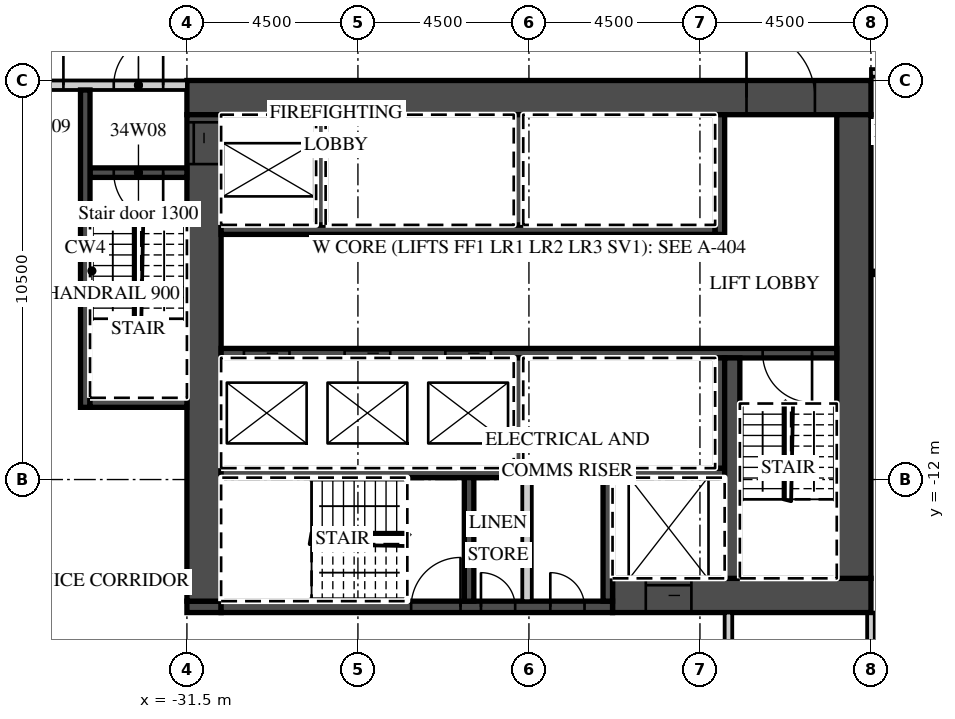
"""IFC4 building model, lengths in metres.
Left out: names, types, materials, properties, quantities, classifications, styles, units other than length and angle.
Written with IfcOpenShell. Run it as: python <this file> out.ifc"""

import sys

from ifc_helpers import new_model, si_unit, direction, frame, frame_2d, origin, place, context, subcontext, project, spatial, rectangle, extrude, element, fill, save


model = new_model("IFC4")
c1 = context("Model", 3, precision=1e-05, world=origin(), true_north=direction((0.0, 1.0)))
c2 = subcontext(c1, "Body", "Model", "MODEL_VIEW")
j1 = project(units=[si_unit("LENGTHUNIT", "METRE"), si_unit("PLANEANGLEUNIT", "RADIAN")], contexts=[c1])
p1 = place(None, origin())
s1 = spatial("IfcSite", under=j1, at=p1, CompositionType="ELEMENT")
p2 = place(p1, origin())
s2 = spatial("IfcBuilding", under=s1, at=p2, CompositionType="ELEMENT")
p3 = place(p2, frame((0.0, 0.0, 147.1)))
s3 = spatial("IfcBuildingStorey", under=s2, at=p3, CompositionType="ELEMENT", Elevation=147.1)
p4 = place(p3, frame((-13.5, -22.232, 0.0), z_axis=(0.0, 0.0, 1.0), x_axis=(0.0, 1.0, 0.0)))
e1 = element("IfcWall", 1, at=p4, inside=s3, PredefinedType="PARTITIONING", context=c2, shape_type="SweptSolid", body=[
    extrude(rectangle(XDim=6.732, YDim=0.2, at=frame_2d((3.366, 0.0))), origin(), (0.0, 0.0, 1.0), 3.0),
])
p5 = place(p3, frame((-13.5, -1.3, 0.0), z_axis=(0.0, 0.0, 1.0), x_axis=(1.0, 0.0, 0.0)))
e2 = element("IfcWall", 2, at=p5, inside=s3, PredefinedType="PARTITIONING", context=c2, shape_type="SweptSolid", body=[
    extrude(rectangle(XDim=60.932, YDim=0.2, at=frame_2d((30.466, 0.0))), origin(), (0.0, 0.0, 1.0), 3.0),
])
p6 = place(p5, frame((2.925, 0.0, 0.0)))
e3 = element("IfcOpeningElement", 3, at=p6, cuts=e2, PredefinedType="OPENING", context=c2, shape_type="SweptSolid", body=[
    extrude(rectangle(XDim=1.0, YDim=2.1, at=frame_2d((0.5, 1.05))), frame((0.0, 0.11, 0.0), z_axis=(0.0, -1.0, 0.0), x_axis=(1.0, 0.0, 0.0)), (0.0, 0.0, 1.0), 0.22),
])
p7 = place(p5, frame((6.938, 0.0, 0.0)))
e4 = element("IfcOpeningElement", 4, at=p7, cuts=e2, PredefinedType="OPENING", context=c2, shape_type="SweptSolid", body=[
    extrude(rectangle(XDim=1.2, YDim=2.1, at=frame_2d((0.6, 1.05))), frame((0.0, 0.11, 0.0), z_axis=(0.0, -1.0, 0.0), x_axis=(1.0, 0.0, 0.0)), (0.0, 0.0, 1.0), 0.22),
])
p8 = place(p5, frame((15.938, 0.0, 0.0)))
e5 = element("IfcOpeningElement", 5, at=p8, cuts=e2, PredefinedType="OPENING", context=c2, shape_type="SweptSolid", body=[
    extrude(rectangle(XDim=1.2, YDim=2.1, at=frame_2d((0.6, 1.05))), frame((0.0, 0.11, 0.0), z_axis=(0.0, -1.0, 0.0), x_axis=(1.0, 0.0, 0.0)), (0.0, 0.0, 1.0), 0.22),
])
p9 = place(p5, frame((24.938, 0.0, 0.0)))
e6 = element("IfcOpeningElement", 6, at=p9, cuts=e2, PredefinedType="OPENING", context=c2, shape_type="SweptSolid", body=[
    extrude(rectangle(XDim=1.2, YDim=2.1, at=frame_2d((0.6, 1.05))), frame((0.0, 0.11, 0.0), z_axis=(0.0, -1.0, 0.0), x_axis=(1.0, 0.0, 0.0)), (0.0, 0.0, 1.0), 0.22),
])
p10 = place(p5, frame((32.075, 0.0, 0.0)))
e7 = element("IfcOpeningElement", 7, at=p10, cuts=e2, PredefinedType="OPENING", context=c2, shape_type="SweptSolid", body=[
    extrude(rectangle(XDim=1.0, YDim=2.1, at=frame_2d((0.5, 1.05))), frame((0.0, 0.11, 0.0), z_axis=(0.0, -1.0, 0.0), x_axis=(1.0, 0.0, 0.0)), (0.0, 0.0, 1.0), 0.22),
])
p11 = place(p5, frame((36.55, 0.0, 0.0)))
e8 = element("IfcOpeningElement", 8, at=p11, cuts=e2, PredefinedType="OPENING", context=c2, shape_type="SweptSolid", body=[
    extrude(rectangle(XDim=1.0, YDim=2.1, at=frame_2d((0.5, 1.05))), frame((0.0, 0.11, 0.0), z_axis=(0.0, -1.0, 0.0), x_axis=(1.0, 0.0, 0.0)), (0.0, 0.0, 1.0), 0.22),
])
p12 = place(p5, frame((42.938, 0.0, 0.0)))
e9 = element("IfcOpeningElement", 9, at=p12, cuts=e2, PredefinedType="OPENING", context=c2, shape_type="SweptSolid", body=[
    extrude(rectangle(XDim=1.2, YDim=2.1, at=frame_2d((0.6, 1.05))), frame((0.0, 0.11, 0.0), z_axis=(0.0, -1.0, 0.0), x_axis=(1.0, 0.0, 0.0)), (0.0, 0.0, 1.0), 0.22),
])
p13 = place(p5, frame((52.425, 0.0, 0.0)))
e10 = element("IfcOpeningElement", 10, at=p13, cuts=e2, PredefinedType="OPENING", context=c2, shape_type="SweptSolid", body=[
    extrude(rectangle(XDim=1.0, YDim=2.1, at=frame_2d((0.5, 1.05))), frame((0.0, 0.11, 0.0), z_axis=(0.0, -1.0, 0.0), x_axis=(1.0, 0.0, 0.0)), (0.0, 0.0, 1.0), 0.22),
])
p14 = place(p5, frame((58.316, 0.0, 0.0)))
e11 = element("IfcOpeningElement", 11, at=p14, cuts=e2, PredefinedType="OPENING", context=c2, shape_type="SweptSolid", body=[
    extrude(rectangle(XDim=1.2, YDim=2.1, at=frame_2d((0.6, 1.05))), frame((0.0, 0.11, 0.0), z_axis=(0.0, -1.0, 0.0), x_axis=(1.0, 0.0, 0.0)), (0.0, 0.0, 1.0), 0.22),
])
p15 = place(p3, frame((-31.5, -1.95, 0.0), z_axis=(0.0, 0.0, 1.0), x_axis=(1.0, 0.0, 0.0)))
e12 = element("IfcWall", 12, at=p15, inside=s3, PredefinedType="SHEAR", context=c2, shape_type="SweptSolid", body=[
    extrude(rectangle(XDim=18.0, YDim=0.9, at=frame_2d((9.0, 0.0))), origin(), (0.0, 0.0, 1.0), 3.0),
])
p16 = place(p15, frame((14.725, 0.0, 0.0)))
e13 = element("IfcOpeningElement", 13, at=p16, cuts=e12, PredefinedType="OPENING", context=c2, shape_type="SweptSolid", body=[
    extrude(rectangle(XDim=1.8, YDim=2.1, at=frame_2d((0.9, 1.05))), frame((0.0, 0.46, 0.0), z_axis=(0.0, -1.0, 0.0), x_axis=(1.0, 0.0, 0.0)), (0.0, 0.0, 1.0), 0.92),
])
p17 = place(p3, frame((-20.3, -15.05, 0.0), z_axis=(0.0, 0.0, 1.0), x_axis=(1.0, 0.0, 0.0)))
e14 = element("IfcWall", 14, at=p17, inside=s3, PredefinedType="SHEAR", context=c2, shape_type="SweptSolid", body=[
    extrude(rectangle(XDim=6.8, YDim=0.9, at=frame_2d((3.4, 0.0))), origin(), (0.0, 0.0, 1.0), 3.0),
])
p18 = place(p17, frame((0.875, 0.0, 0.0)))
e15 = element("IfcOpeningElement", 15, at=p18, cuts=e14, PredefinedType="OPENING", context=c2, shape_type="SweptSolid", body=[
    extrude(rectangle(XDim=1.2, YDim=2.1, at=frame_2d((0.6, 1.05))), frame((0.0, 0.46, 0.0), z_axis=(0.0, -1.0, 0.0), x_axis=(1.0, 0.0, 0.0)), (0.0, 0.0, 1.0), 0.92),
])
p19 = place(p3, frame((-31.5, -15.35, 0.0), z_axis=(0.0, 0.0, 1.0), x_axis=(1.0, 0.0, 0.0)))
e16 = element("IfcWall", 16, at=p19, inside=s3, PredefinedType="SHEAR", context=c2, shape_type="SweptSolid", body=[
    extrude(rectangle(XDim=0.9, YDim=0.3, at=frame_2d((0.45, 0.0))), origin(), (0.0, 0.0, 1.0), 3.0),
])
p20 = place(p3, frame((-30.6, -15.35, 0.0), z_axis=(0.0, 0.0, 1.0), x_axis=(1.0, 0.0, 0.0)))
e17 = element("IfcWall", 17, at=p20, inside=s3, PredefinedType="SHEAR", context=c2, shape_type="SweptSolid", body=[
    extrude(rectangle(XDim=10.3, YDim=0.3, at=frame_2d((5.15, 0.0))), origin(), (0.0, 0.0, 1.0), 3.0),
])
p21 = place(p20, frame((5.0, 0.0, 0.0)))
e18 = element("IfcOpeningElement", 18, at=p21, cuts=e17, PredefinedType="OPENING", context=c2, shape_type="SweptSolid", body=[
    extrude(rectangle(XDim=1.3, YDim=2.1, at=frame_2d((0.65, 1.05))), frame((0.0, 0.16, 0.0), z_axis=(0.0, -1.0, 0.0), x_axis=(1.0, 0.0, 0.0)), (0.0, 0.0, 1.0), 0.32),
])
p22 = place(p20, frame((6.837, 0.0, 0.0)))
e19 = element("IfcOpeningElement", 19, at=p22, cuts=e17, PredefinedType="OPENING", context=c2, shape_type="SweptSolid", body=[
    extrude(rectangle(XDim=0.9, YDim=2.1, at=frame_2d((0.45, 1.05))), frame((0.0, 0.16, 0.0), z_axis=(0.0, -1.0, 0.0), x_axis=(1.0, 0.0, 0.0)), (0.0, 0.0, 1.0), 0.32),
])
p23 = place(p20, frame((8.663, 0.0, 0.0)))
e20 = element("IfcOpeningElement", 20, at=p23, cuts=e17, PredefinedType="OPENING", context=c2, shape_type="SweptSolid", body=[
    extrude(rectangle(XDim=0.9, YDim=2.1, at=frame_2d((0.45, 1.05))), frame((0.0, 0.16, 0.0), z_axis=(0.0, -1.0, 0.0), x_axis=(1.0, 0.0, 0.0)), (0.0, 0.0, 1.0), 0.32),
])
p24 = place(p3, frame((-31.05, -15.2, 0.0), z_axis=(0.0, 0.0, 1.0), x_axis=(0.0, 1.0, 0.0)))
e21 = element("IfcWall", 21, at=p24, inside=s3, PredefinedType="SHEAR", context=c2, shape_type="SweptSolid", body=[
    extrude(rectangle(XDim=12.8, YDim=0.9, at=frame_2d((6.4, 0.0))), origin(), (0.0, 0.0, 1.0), 3.0),
])
p25 = place(p24, frame((11.5, 0.0, 0.0)))
e22 = element("IfcOpeningElement", 22, at=p25, cuts=e21, PredefinedType="OPENING", context=c2, shape_type="SweptSolid", body=[
    extrude(rectangle(XDim=1.1, YDim=2.1, at=frame_2d((0.55, 1.05))), frame((0.0, 0.46, 0.0), z_axis=(0.0, -1.0, 0.0), x_axis=(1.0, 0.0, 0.0)), (0.0, 0.0, 1.0), 0.92),
])
p26 = place(p3, frame((-13.95, -14.6, 0.0), z_axis=(0.0, 0.0, 1.0), x_axis=(0.0, 1.0, 0.0)))
e23 = element("IfcWall", 23, at=p26, inside=s3, PredefinedType="SHEAR", context=c2, shape_type="SweptSolid", body=[
    extrude(rectangle(XDim=12.2, YDim=0.9, at=frame_2d((6.1, 0.0))), origin(), (0.0, 0.0, 1.0), 3.0),
])
p27 = place(p3, frame((-30.6, -5.425, 0.0), z_axis=(0.0, 0.0, 1.0), x_axis=(1.0, 0.0, 0.0)))
e24 = element("IfcWall", 24, at=p27, inside=s3, PredefinedType="SHEAR", context=c2, shape_type="SweptSolid", body=[
    extrude(rectangle(XDim=13.0, YDim=0.25, at=frame_2d((6.5, 0.0))), origin(), (0.0, 0.0, 1.0), 3.0),
])
p28 = place(p3, frame((-17.475, -5.55, 0.0), z_axis=(0.0, 0.0, 1.0), x_axis=(0.0, 1.0, 0.0)))
e25 = element("IfcWall", 25, at=p28, inside=s3, PredefinedType="SHEAR", context=c2, shape_type="SweptSolid", body=[
    extrude(rectangle(XDim=3.15, YDim=0.25, at=frame_2d((1.575, 0.0))), origin(), (0.0, 0.0, 1.0), 3.0),
])
for number, where, z_axis, x_axis in (
    (26, (-27.975, -5.3, 0.0), (0.0, 0.0, 1.0), (0.0, 1.0, 0.0)),
    (27, (-22.775, -5.3, 0.0), (0.0, 0.0, 1.0), (0.0, 1.0, 0.0)),
):
    element("IfcWall", number, at=place(p3, frame(where, z_axis=z_axis, x_axis=x_axis)), inside=s3, PredefinedType="SHEAR", context=c2, shape_type="SweptSolid", body=[
        extrude(rectangle(XDim=2.9, YDim=0.25, at=frame_2d((1.45, 0.0))), origin(), (0.0, 0.0, 1.0), 3.0),
    ])
p29 = place(p3, frame((-30.6, -8.675, 0.0), z_axis=(0.0, 0.0, 1.0), x_axis=(1.0, 0.0, 0.0)))
e28 = element("IfcWall", 28, at=p29, inside=s3, PredefinedType="SHEAR", context=c2, shape_type="SweptSolid", body=[
    extrude(rectangle(XDim=16.2, YDim=0.25, at=frame_2d((8.1, 0.0))), origin(), (0.0, 0.0, 1.0), 3.0),
])
p30 = place(p29, frame((0.6, 0.0, 0.0)))
e29 = element("IfcOpeningElement", 29, at=p30, cuts=e28, PredefinedType="OPENING", context=c2, shape_type="SweptSolid", body=[
    extrude(rectangle(XDim=1.2, YDim=2.1, at=frame_2d((0.6, 1.05))), frame((0.0, 0.135, 0.0), z_axis=(0.0, -1.0, 0.0), x_axis=(1.0, 0.0, 0.0)), (0.0, 0.0, 1.0), 0.27),
])
p31 = place(p29, frame((3.25, 0.0, 0.0)))
e30 = element("IfcOpeningElement", 30, at=p31, cuts=e28, PredefinedType="OPENING", context=c2, shape_type="SweptSolid", body=[
    extrude(rectangle(XDim=1.2, YDim=2.1, at=frame_2d((0.6, 1.05))), frame((0.0, 0.135, 0.0), z_axis=(0.0, -1.0, 0.0), x_axis=(1.0, 0.0, 0.0)), (0.0, 0.0, 1.0), 0.27),
])
p32 = place(p29, frame((5.9, 0.0, 0.0)))
e31 = element("IfcOpeningElement", 31, at=p32, cuts=e28, PredefinedType="OPENING", context=c2, shape_type="SweptSolid", body=[
    extrude(rectangle(XDim=1.2, YDim=2.1, at=frame_2d((0.6, 1.05))), frame((0.0, 0.135, 0.0), z_axis=(0.0, -1.0, 0.0), x_axis=(1.0, 0.0, 0.0)), (0.0, 0.0, 1.0), 0.27),
])
p33 = place(p29, frame((14.25, 0.0, 0.0)))
e32 = element("IfcOpeningElement", 32, at=p33, cuts=e28, PredefinedType="OPENING", context=c2, shape_type="SweptSolid", body=[
    extrude(rectangle(XDim=1.3, YDim=2.1, at=frame_2d((0.65, 1.05))), frame((0.0, 0.135, 0.0), z_axis=(0.0, -1.0, 0.0), x_axis=(1.0, 0.0, 0.0)), (0.0, 0.0, 1.0), 0.27),
])
p34 = place(p3, frame((-30.6, -11.825, 0.0), z_axis=(0.0, 0.0, 1.0), x_axis=(1.0, 0.0, 0.0)))
e33 = element("IfcWall", 33, at=p34, inside=s3, PredefinedType="SHEAR", context=c2, shape_type="SweptSolid", body=[
    extrude(rectangle(XDim=13.25, YDim=0.25, at=frame_2d((6.625, 0.0))), origin(), (0.0, 0.0, 1.0), 3.0),
])
for number, where, z_axis, x_axis in (
    (34, (-17.475, -11.7, 0.0), (0.0, 0.0, 1.0), (0.0, 1.0, 0.0)),
    (35, (-22.775, -11.7, 0.0), (0.0, 0.0, 1.0), (0.0, 1.0, 0.0)),
):
    element("IfcWall", number, at=place(p3, frame(where, z_axis=z_axis, x_axis=x_axis)), inside=s3, PredefinedType="SHEAR", context=c2, shape_type="SweptSolid", body=[
        extrude(rectangle(XDim=2.9, YDim=0.25, at=frame_2d((1.45, 0.0))), origin(), (0.0, 0.0, 1.0), 3.0),
    ])
p35 = place(p3, frame((-17.15, -14.6, 0.0), z_axis=(0.0, 0.0, 1.0), x_axis=(0.0, 1.0, 0.0)))
e36 = element("IfcWall", 36, at=p35, inside=s3, PredefinedType="SHEAR", context=c2, shape_type="SweptSolid", body=[
    extrude(rectangle(XDim=5.8, YDim=0.4, at=frame_2d((2.9, 0.0))), origin(), (0.0, 0.0, 1.0), 3.0),
])
for number, where, z_axis, x_axis in (
    (37, (-20.425, -15.2, 0.0), (0.0, 0.0, 1.0), (0.0, 1.0, 0.0)),
    (38, (-24.075, -15.2, 0.0), (0.0, 0.0, 1.0), (0.0, 1.0, 0.0)),
):
    element("IfcWall", number, at=place(p3, frame(where, z_axis=z_axis, x_axis=x_axis)), inside=s3, PredefinedType="SHEAR", context=c2, shape_type="SweptSolid", body=[
        extrude(rectangle(XDim=3.25, YDim=0.25, at=frame_2d((1.625, 0.0))), origin(), (0.0, 0.0, 1.0), 3.0),
    ])
p36 = place(p3, frame((-22.55, -15.2, 0.0), z_axis=(0.0, 0.0, 1.0), x_axis=(0.0, 1.0, 0.0)))
e39 = element("IfcWall", 39, at=p36, inside=s3, PredefinedType="PARTITIONING", context=c2, shape_type="SweptSolid", body=[
    extrude(rectangle(XDim=3.25, YDim=0.25, at=frame_2d((1.625, 0.0))), origin(), (0.0, 0.0, 1.0), 3.0),
])
p37 = place(p3, frame((-39.035, -1.625, 0.0), z_axis=(0.0, 0.0, 1.0), x_axis=(1.0, 0.0, 0.0)))
e40 = element("IfcWall", 40, at=p37, inside=s3, PredefinedType="PARTITIONING", context=c2, shape_type="SweptSolid", body=[
    extrude(rectangle(XDim=7.535, YDim=0.25, at=frame_2d((3.768, 0.0))), origin(), (0.0, 0.0, 1.0), 3.0),
])
p38 = place(p37, frame((5.61, 0.0, 0.0)))
e41 = element("IfcOpeningElement", 41, at=p38, cuts=e40, PredefinedType="OPENING", context=c2, shape_type="SweptSolid", body=[
    extrude(rectangle(XDim=1.3, YDim=2.1, at=frame_2d((0.65, 1.05))), frame((0.0, 0.135, 0.0), z_axis=(0.0, -1.0, 0.0), x_axis=(1.0, 0.0, 0.0)), (0.0, 0.0, 1.0), 0.27),
])
p39 = place(p37, frame((3.185, 0.0, 0.0)))
e42 = element("IfcOpeningElement", 42, at=p39, cuts=e40, PredefinedType="OPENING", context=c2, shape_type="SweptSolid", body=[
    extrude(rectangle(XDim=1.1, YDim=2.1, at=frame_2d((0.55, 1.05))), frame((0.0, 0.135, 0.0), z_axis=(0.0, -1.0, 0.0), x_axis=(1.0, 0.0, 0.0)), (0.0, 0.0, 1.0), 0.27),
])
p40 = place(p3, frame((-34.05, -3.925, 0.0), z_axis=(0.0, 0.0, 1.0), x_axis=(1.0, 0.0, 0.0)))
e43 = element("IfcWall", 43, at=p40, inside=s3, PredefinedType="SHEAR", context=c2, shape_type="SweptSolid", body=[
    extrude(rectangle(XDim=2.55, YDim=0.25, at=frame_2d((1.275, 0.0))), origin(), (0.0, 0.0, 1.0), 3.0),
])
p41 = place(p40, frame((0.625, 0.0, 0.0)))
e44 = element("IfcOpeningElement", 44, at=p41, cuts=e43, PredefinedType="OPENING", context=c2, shape_type="SweptSolid", body=[
    extrude(rectangle(XDim=1.3, YDim=2.1, at=frame_2d((0.65, 1.05))), frame((0.0, 0.135, 0.0), z_axis=(0.0, -1.0, 0.0), x_axis=(1.0, 0.0, 0.0)), (0.0, 0.0, 1.0), 0.27),
])
p42 = place(p3, frame((-34.175, -10.1, 0.0), z_axis=(0.0, 0.0, 1.0), x_axis=(0.0, 1.0, 0.0)))
e45 = element("IfcWall", 45, at=p42, inside=s3, PredefinedType="SHEAR", context=c2, shape_type="SweptSolid", body=[
    extrude(rectangle(XDim=8.35, YDim=0.25, at=frame_2d((4.175, 0.0))), origin(), (0.0, 0.0, 1.0), 3.0),
])
p43 = place(p3, frame((-34.05, -9.975, 0.0), z_axis=(0.0, 0.0, 1.0), x_axis=(1.0, 0.0, 0.0)))
e46 = element("IfcWall", 46, at=p43, inside=s3, PredefinedType="SHEAR", context=c2, shape_type="SweptSolid", body=[
    extrude(rectangle(XDim=2.55, YDim=0.25, at=frame_2d((1.275, 0.0))), origin(), (0.0, 0.0, 1.0), 3.0),
])
p44 = place(p3, frame((-17.25, -17.7, 0.0), z_axis=(0.0, 0.0, 1.0), x_axis=(0.0, 1.0, 0.0)))
e47 = element("IfcWall", 47, at=p44, inside=s3, PredefinedType="PARTITIONING", context=c2, shape_type="SweptSolid", body=[
    extrude(rectangle(XDim=2.2, YDim=0.2, at=frame_2d((1.1, 0.0))), origin(), (0.0, 0.0, 1.0), 3.0),
])
p45 = place(p30, origin())
e48 = element("IfcDoor", 48, at=p45, inside=s3, OperationType="SLIDING_TO_LEFT", PredefinedType="DOOR", context=c2, shape_type="SweptSolid", body=[
    extrude(rectangle(XDim=1.2, YDim=2.1, at=frame_2d((0.6, 1.05))), frame((0.0, 0.025, 0.0), z_axis=(0.0, -1.0, 0.0), x_axis=(1.0, 0.0, 0.0)), (0.0, 0.0, 1.0), 0.05),
])
fill(e29, e48)
p46 = place(p31, origin())
e49 = element("IfcDoor", 49, at=p46, inside=s3, OperationType="SLIDING_TO_RIGHT", PredefinedType="DOOR", context=c2, shape_type="SweptSolid", body=[
    extrude(rectangle(XDim=1.2, YDim=2.1, at=frame_2d((0.6, 1.05))), frame((0.0, 0.025, 0.0), z_axis=(0.0, -1.0, 0.0), x_axis=(1.0, 0.0, 0.0)), (0.0, 0.0, 1.0), 0.05),
])
fill(e30, e49)
p47 = place(p32, origin())
e50 = element("IfcDoor", 50, at=p47, inside=s3, OperationType="SLIDING_TO_RIGHT", PredefinedType="DOOR", context=c2, shape_type="SweptSolid", body=[
    extrude(rectangle(XDim=1.2, YDim=2.1, at=frame_2d((0.6, 1.05))), frame((0.0, 0.025, 0.0), z_axis=(0.0, -1.0, 0.0), x_axis=(1.0, 0.0, 0.0)), (0.0, 0.0, 1.0), 0.05),
])
fill(e31, e50)
p48 = place(p18, origin())
e51 = element("IfcDoor", 51, at=p48, inside=s3, OperationType="SLIDING_TO_LEFT", PredefinedType="DOOR", context=c2, shape_type="SweptSolid", body=[
    extrude(rectangle(XDim=1.2, YDim=2.1, at=frame_2d((0.6, 1.05))), frame((0.0, 0.025, 0.0), z_axis=(0.0, -1.0, 0.0), x_axis=(1.0, 0.0, 0.0)), (0.0, 0.0, 1.0), 0.05),
])
fill(e15, e51)
p49 = place(p25, origin())
e52 = element("IfcDoor", 52, at=p49, inside=s3, OperationType="SLIDING_TO_RIGHT", PredefinedType="DOOR", context=c2, shape_type="SweptSolid", body=[
    extrude(rectangle(XDim=1.1, YDim=2.1, at=frame_2d((0.55, 1.05))), frame((0.0, 0.025, 0.0), z_axis=(0.0, -1.0, 0.0), x_axis=(1.0, 0.0, 0.0)), (0.0, 0.0, 1.0), 0.05),
])
fill(e22, e52)
p50 = place(p16, origin())
e53 = element("IfcDoor", 53, at=p50, inside=s3, OperationType="DOUBLE_DOOR_DOUBLE_SWING", PredefinedType="DOOR", context=c2, shape_type="SweptSolid", body=[
    extrude(rectangle(XDim=1.8, YDim=2.1, at=frame_2d((0.9, 1.05))), frame((0.0, 0.025, 0.0), z_axis=(0.0, -1.0, 0.0), x_axis=(1.0, 0.0, 0.0)), (0.0, 0.0, 1.0), 0.05),
])
fill(e13, e53)
p51 = place(p38, origin())
e54 = element("IfcDoor", 54, at=p51, inside=s3, OperationType="SINGLE_SWING_RIGHT", PredefinedType="DOOR", context=c2, shape_type="SweptSolid", body=[
    extrude(rectangle(XDim=1.3, YDim=2.1, at=frame_2d((0.65, 1.05))), frame((0.0, 0.025, 0.0), z_axis=(0.0, -1.0, 0.0), x_axis=(1.0, 0.0, 0.0)), (0.0, 0.0, 1.0), 0.05),
])
fill(e41, e54)
p52 = place(p41, origin())
e55 = element("IfcDoor", 55, at=p52, inside=s3, OperationType="SINGLE_SWING_RIGHT", PredefinedType="DOOR", context=c2, shape_type="SweptSolid", body=[
    extrude(rectangle(XDim=1.3, YDim=2.1, at=frame_2d((0.65, 1.05))), frame((0.0, 0.025, 0.0), z_axis=(0.0, -1.0, 0.0), x_axis=(1.0, 0.0, 0.0)), (0.0, 0.0, 1.0), 0.05),
])
fill(e44, e55)
p53 = place(p39, origin())
e56 = element("IfcDoor", 56, at=p53, inside=s3, OperationType="SINGLE_SWING_RIGHT", PredefinedType="DOOR", context=c2, shape_type="SweptSolid", body=[
    extrude(rectangle(XDim=1.1, YDim=2.1, at=frame_2d((0.55, 1.05))), frame((0.0, 0.025, 0.0), z_axis=(0.0, -1.0, 0.0), x_axis=(1.0, 0.0, 0.0)), (0.0, 0.0, 1.0), 0.05),
])
fill(e42, e56)
p54 = place(p33, origin())
e57 = element("IfcDoor", 57, at=p54, inside=s3, OperationType="SINGLE_SWING_RIGHT", PredefinedType="DOOR", context=c2, shape_type="SweptSolid", body=[
    extrude(rectangle(XDim=1.3, YDim=2.1, at=frame_2d((0.65, 1.05))), frame((0.0, 0.025, 0.0), z_axis=(0.0, -1.0, 0.0), x_axis=(1.0, 0.0, 0.0)), (0.0, 0.0, 1.0), 0.05),
])
fill(e32, e57)
p55 = place(p21, origin())
e58 = element("IfcDoor", 58, at=p55, inside=s3, OperationType="SINGLE_SWING_RIGHT", PredefinedType="DOOR", context=c2, shape_type="SweptSolid", body=[
    extrude(rectangle(XDim=1.3, YDim=2.1, at=frame_2d((0.65, 1.05))), frame((0.0, 0.025, 0.0), z_axis=(0.0, -1.0, 0.0), x_axis=(1.0, 0.0, 0.0)), (0.0, 0.0, 1.0), 0.05),
])
fill(e18, e58)
p56 = place(p22, origin())
e59 = element("IfcDoor", 59, at=p56, inside=s3, OperationType="SINGLE_SWING_LEFT", PredefinedType="DOOR", context=c2, shape_type="SweptSolid", body=[
    extrude(rectangle(XDim=0.9, YDim=2.1, at=frame_2d((0.45, 1.05))), frame((0.0, 0.025, 0.0), z_axis=(0.0, -1.0, 0.0), x_axis=(1.0, 0.0, 0.0)), (0.0, 0.0, 1.0), 0.05),
])
fill(e19, e59)
p57 = place(p23, origin())
e60 = element("IfcDoor", 60, at=p57, inside=s3, OperationType="SINGLE_SWING_LEFT", PredefinedType="DOOR", context=c2, shape_type="SweptSolid", body=[
    extrude(rectangle(XDim=0.9, YDim=2.1, at=frame_2d((0.45, 1.05))), frame((0.0, 0.025, 0.0), z_axis=(0.0, -1.0, 0.0), x_axis=(1.0, 0.0, 0.0)), (0.0, 0.0, 1.0), 0.05),
])
fill(e20, e60)
save(model, sys.argv[1])
